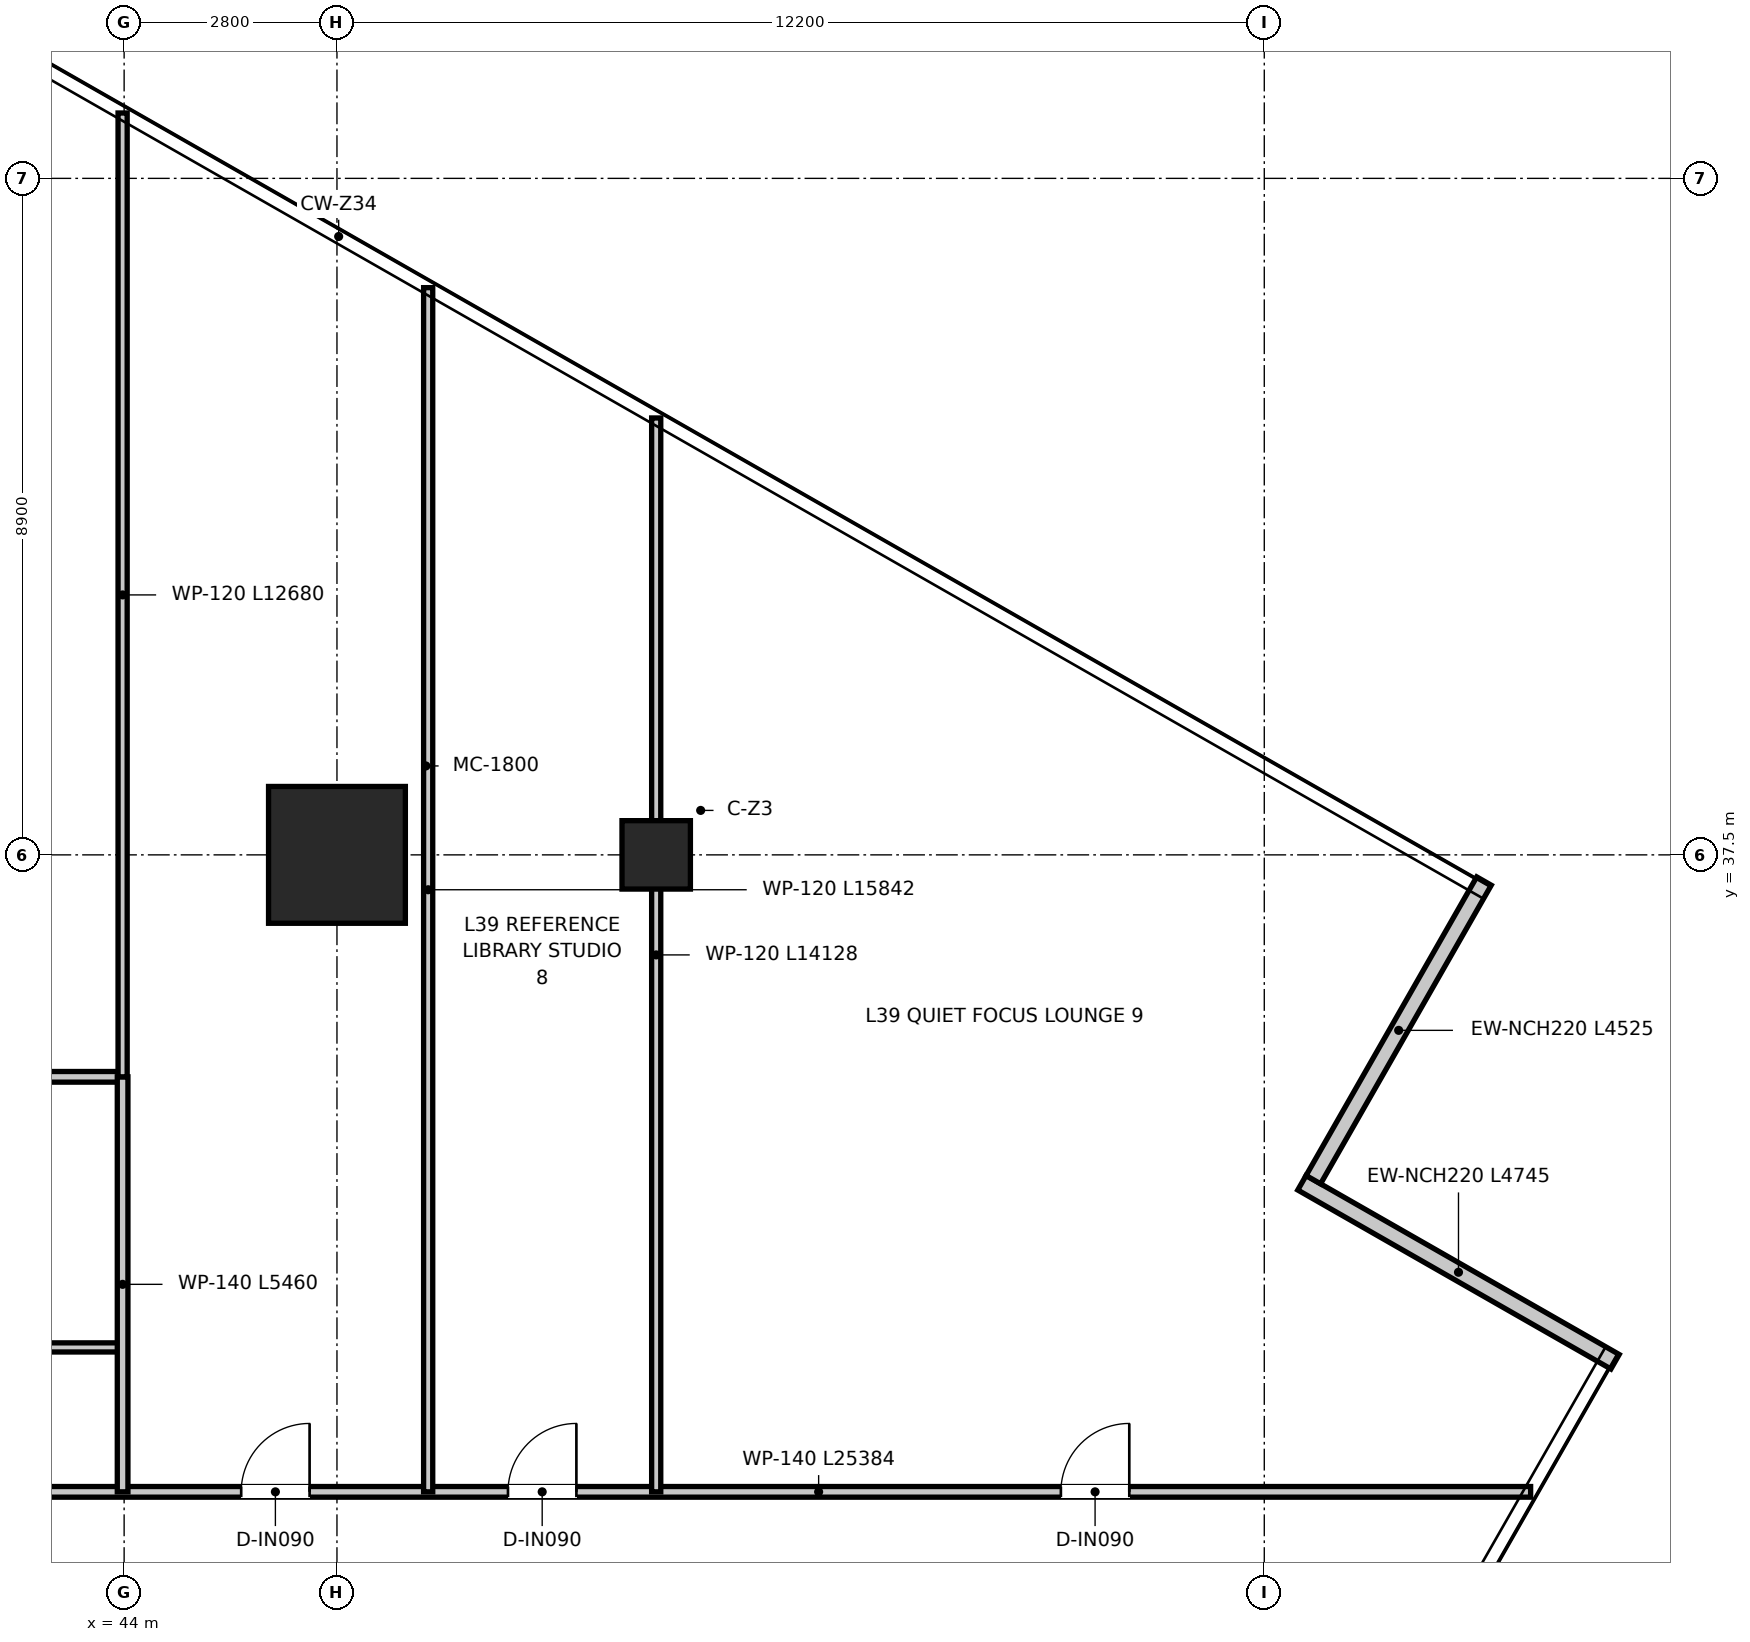
"""IFC4 building model, lengths in metres.
Left out: names, types, materials, properties, quantities, classifications, styles, units other than length and angle.
Written with IfcOpenShell. Run it as: python <this file> out.ifc"""

import sys

from ifc_helpers import new_model, si_unit, direction, frame, frame_2d, origin, origin_2d, place, context, subcontext, project, spatial, rectangle, extrude, source, transform, mapped, element, fill, save


model = new_model("IFC4")
c1 = context("Model", 3, precision=1e-05, world=origin(), true_north=direction((0.0, 1.0)))
c2 = subcontext(c1, "Body", "Model", "MODEL_VIEW")
j1 = project(units=[si_unit("LENGTHUNIT", "METRE"), si_unit("PLANEANGLEUNIT", "RADIAN")], contexts=[c1])
p1 = place(None, origin())
s1 = spatial("IfcSite", under=j1, at=p1, CompositionType="ELEMENT")
p2 = place(p1, origin())
s2 = spatial("IfcBuilding", under=s1, at=p2, CompositionType="ELEMENT")
p3 = place(p2, frame((0.0, 0.0, 162.0)))
s3 = spatial("IfcBuildingStorey", under=s2, at=p3, CompositionType="ELEMENT", Elevation=162.0)
m1 = source(origin(), c2, "Body", "SweptSolid", [
    extrude(rectangle(XDim=1.8, YDim=1.8, at=origin_2d()), origin(), (0.0, 0.0, 1.0), 3.95),
])
p4 = place(p3, frame((46.8, 37.5, 0.0), z_axis=(0.0, 0.0, 1.0), x_axis=(1.0, 0.0, 0.0)))
e1 = element("IfcColumn", 1, at=p4, inside=s3, PredefinedType="USERDEFINED", context=c2, shape_type="MappedRepresentation", body=[
    mapped(m1, transform((0.0, 0.0, 0.0), x_axis=(1.0, 0.0, 0.0), y_axis=(0.0, 1.0, 0.0), z_axis=(0.0, 0.0, 1.0), scale=1.0)),
])
m2 = source(origin(), c2, "Body", "SweptSolid", [
    extrude(rectangle(XDim=0.9, YDim=0.9, at=origin_2d()), origin(), (0.0, 0.0, 1.0), 3.95),
])
p5 = place(p3, frame((51.0, 37.5, 0.0), z_axis=(0.0, 0.0, 1.0), x_axis=(1.0, 0.0, 0.0)))
e2 = element("IfcColumn", 2, at=p5, inside=s3, PredefinedType="COLUMN", context=c2, shape_type="MappedRepresentation", body=[
    mapped(m2, transform((0.0, 0.0, 0.0), x_axis=(1.0, 0.0, 0.0), y_axis=(0.0, 1.0, 0.0), z_axis=(0.0, 0.0, 1.0), scale=1.0)),
])
p6 = place(p3, frame((63.615, 30.832, 0.0), z_axis=(0.0, 0.0, 1.0), x_axis=(-0.868170306664, 0.496266378698, 0.0)))
e3 = element("IfcWall", 3, at=p6, inside=s3, PredefinedType="ELEMENTEDWALL", context=c2, shape_type="SweptSolid", body=[
    extrude(rectangle(XDim=4.745, YDim=0.22, at=frame_2d((2.373, 0.0))), origin(), (0.0, 0.0, 1.0), 3.67),
])
p7 = place(p3, frame((59.645, 33.227, 0.0), z_axis=(0.0, 0.0, 1.0), x_axis=(0.496202850194, 0.868206617954, 0.0)))
e4 = element("IfcWall", 4, at=p7, inside=s3, PredefinedType="ELEMENTEDWALL", context=c2, shape_type="SweptSolid", body=[
    extrude(rectangle(XDim=4.525, YDim=0.22, at=frame_2d((2.263, 0.0))), origin(), (0.0, 0.0, 1.0), 3.67),
])
p8 = place(p3, frame((37.12, 29.12, 0.0), z_axis=(0.0, 0.0, 1.0), x_axis=(1.0, 0.0, 0.0)))
e5 = element("IfcWall", 5, at=p8, inside=s3, PredefinedType="PARTITIONING", context=c2, shape_type="SweptSolid", body=[
    extrude(rectangle(XDim=25.384, YDim=0.14, at=frame_2d((12.692, 0.0))), origin(), (0.0, 0.0, 1.0), 3.03),
])
p9 = place(p8, frame((3.03, 0.0, 0.0)))
e6 = element("IfcOpeningElement", 6, at=p9, cuts=e5, PredefinedType="OPENING", context=c2, shape_type="SweptSolid", body=[
    extrude(rectangle(XDim=0.9, YDim=2.1, at=frame_2d((0.45, 1.05))), frame((0.0, 0.08, 0.0), z_axis=(0.0, -1.0, 0.0), x_axis=(1.0, 0.0, 0.0)), (0.0, 0.0, 1.0), 0.16),
])
p10 = place(p8, frame((8.42, 0.0, 0.0)))
e7 = element("IfcOpeningElement", 7, at=p10, cuts=e5, PredefinedType="OPENING", context=c2, shape_type="SweptSolid", body=[
    extrude(rectangle(XDim=0.9, YDim=2.1, at=frame_2d((0.45, 1.05))), frame((0.0, 0.08, 0.0), z_axis=(0.0, -1.0, 0.0), x_axis=(1.0, 0.0, 0.0)), (0.0, 0.0, 1.0), 0.16),
])
p11 = place(p8, frame((11.93, 0.0, 0.0)))
e8 = element("IfcOpeningElement", 8, at=p11, cuts=e5, PredefinedType="OPENING", context=c2, shape_type="SweptSolid", body=[
    extrude(rectangle(XDim=0.9, YDim=2.1, at=frame_2d((0.45, 1.05))), frame((0.0, 0.08, 0.0), z_axis=(0.0, -1.0, 0.0), x_axis=(1.0, 0.0, 0.0)), (0.0, 0.0, 1.0), 0.16),
])
p12 = place(p8, frame((19.204, 0.0, 0.0)))
e9 = element("IfcOpeningElement", 9, at=p12, cuts=e5, PredefinedType="OPENING", context=c2, shape_type="SweptSolid", body=[
    extrude(rectangle(XDim=0.9, YDim=2.1, at=frame_2d((0.45, 1.05))), frame((0.0, 0.08, 0.0), z_axis=(0.0, -1.0, 0.0), x_axis=(1.0, 0.0, 0.0)), (0.0, 0.0, 1.0), 0.16),
])
p13 = place(p3, frame((37.12, 31.02, 0.0), z_axis=(0.0, 0.0, 1.0), x_axis=(1.0, 0.0, 0.0)))
e10 = element("IfcWall", 10, at=p13, inside=s3, PredefinedType="PARTITIONING", context=c2, shape_type="SweptSolid", body=[
    extrude(rectangle(XDim=6.86, YDim=0.12, at=frame_2d((3.43, 0.0))), origin(), (0.0, 0.0, 1.0), 3.08),
])
p14 = place(p3, frame((37.12, 34.58, 0.0), z_axis=(0.0, 0.0, 1.0), x_axis=(1.0, 0.0, 0.0)))
e11 = element("IfcWall", 11, at=p14, inside=s3, PredefinedType="PARTITIONING", context=c2, shape_type="SweptSolid", body=[
    extrude(rectangle(XDim=6.86, YDim=0.14, at=frame_2d((3.43, 0.0))), origin(), (0.0, 0.0, 1.0), 3.08),
])
p15 = place(p3, frame((43.98, 29.12, 0.0), z_axis=(0.0, 0.0, 1.0), x_axis=(0.0, 1.0, 0.0)))
e12 = element("IfcWall", 12, at=p15, inside=s3, PredefinedType="PARTITIONING", context=c2, shape_type="SweptSolid", body=[
    extrude(rectangle(XDim=5.46, YDim=0.14, at=frame_2d((2.73, 0.0))), origin(), (0.0, 0.0, 1.0), 3.31),
])
p16 = place(p3, frame((43.98, 34.58, 0.0), z_axis=(0.0, 0.0, 1.0), x_axis=(0.0, 1.0, 0.0)))
e13 = element("IfcWall", 13, at=p16, inside=s3, PredefinedType="PARTITIONING", context=c2, shape_type="SweptSolid", body=[
    extrude(rectangle(XDim=12.68, YDim=0.12, at=frame_2d((6.34, 0.0))), origin(), (0.0, 0.0, 1.0), 3.03),
])
p17 = place(p3, frame((48.0, 29.12, 0.0), z_axis=(0.0, 0.0, 1.0), x_axis=(0.0, 1.0, 0.0)))
e14 = element("IfcWall", 14, at=p17, inside=s3, PredefinedType="PARTITIONING", context=c2, shape_type="SweptSolid", body=[
    extrude(rectangle(XDim=15.842, YDim=0.12, at=frame_2d((7.921, 0.0))), origin(), (0.0, 0.0, 1.0), 3.08),
])
p18 = place(p3, frame((51.0, 29.12, 0.0), z_axis=(0.0, 0.0, 1.0), x_axis=(0.0, 1.0, 0.0)))
e15 = element("IfcWall", 15, at=p18, inside=s3, PredefinedType="PARTITIONING", context=c2, shape_type="SweptSolid", body=[
    extrude(rectangle(XDim=14.128, YDim=0.12, at=frame_2d((7.064, 0.0))), origin(), (0.0, 0.0, 1.0), 3.08),
])
p19 = place(p10, origin())
e16 = element("IfcDoor", 16, at=p19, inside=s3, OperationType="SINGLE_SWING_RIGHT", PredefinedType="DOOR", context=c2, shape_type="SweptSolid", body=[
    extrude(rectangle(XDim=0.9, YDim=2.1, at=frame_2d((0.45, 1.05))), frame((0.0, 0.025, 0.0), z_axis=(0.0, -1.0, 0.0), x_axis=(1.0, 0.0, 0.0)), (0.0, 0.0, 1.0), 0.05),
])
fill(e7, e16)
p20 = place(p11, origin())
e17 = element("IfcDoor", 17, at=p20, inside=s3, OperationType="SINGLE_SWING_RIGHT", PredefinedType="DOOR", context=c2, shape_type="SweptSolid", body=[
    extrude(rectangle(XDim=0.9, YDim=2.1, at=frame_2d((0.45, 1.05))), frame((0.0, 0.025, 0.0), z_axis=(0.0, -1.0, 0.0), x_axis=(1.0, 0.0, 0.0)), (0.0, 0.0, 1.0), 0.05),
])
fill(e8, e17)
p21 = place(p12, origin())
e18 = element("IfcDoor", 18, at=p21, inside=s3, OperationType="SINGLE_SWING_RIGHT", PredefinedType="DOOR", context=c2, shape_type="SweptSolid", body=[
    extrude(rectangle(XDim=0.9, YDim=2.1, at=frame_2d((0.45, 1.05))), frame((0.0, 0.025, 0.0), z_axis=(0.0, -1.0, 0.0), x_axis=(1.0, 0.0, 0.0)), (0.0, 0.0, 1.0), 0.05),
])
fill(e9, e18)
save(model, sys.argv[1])
